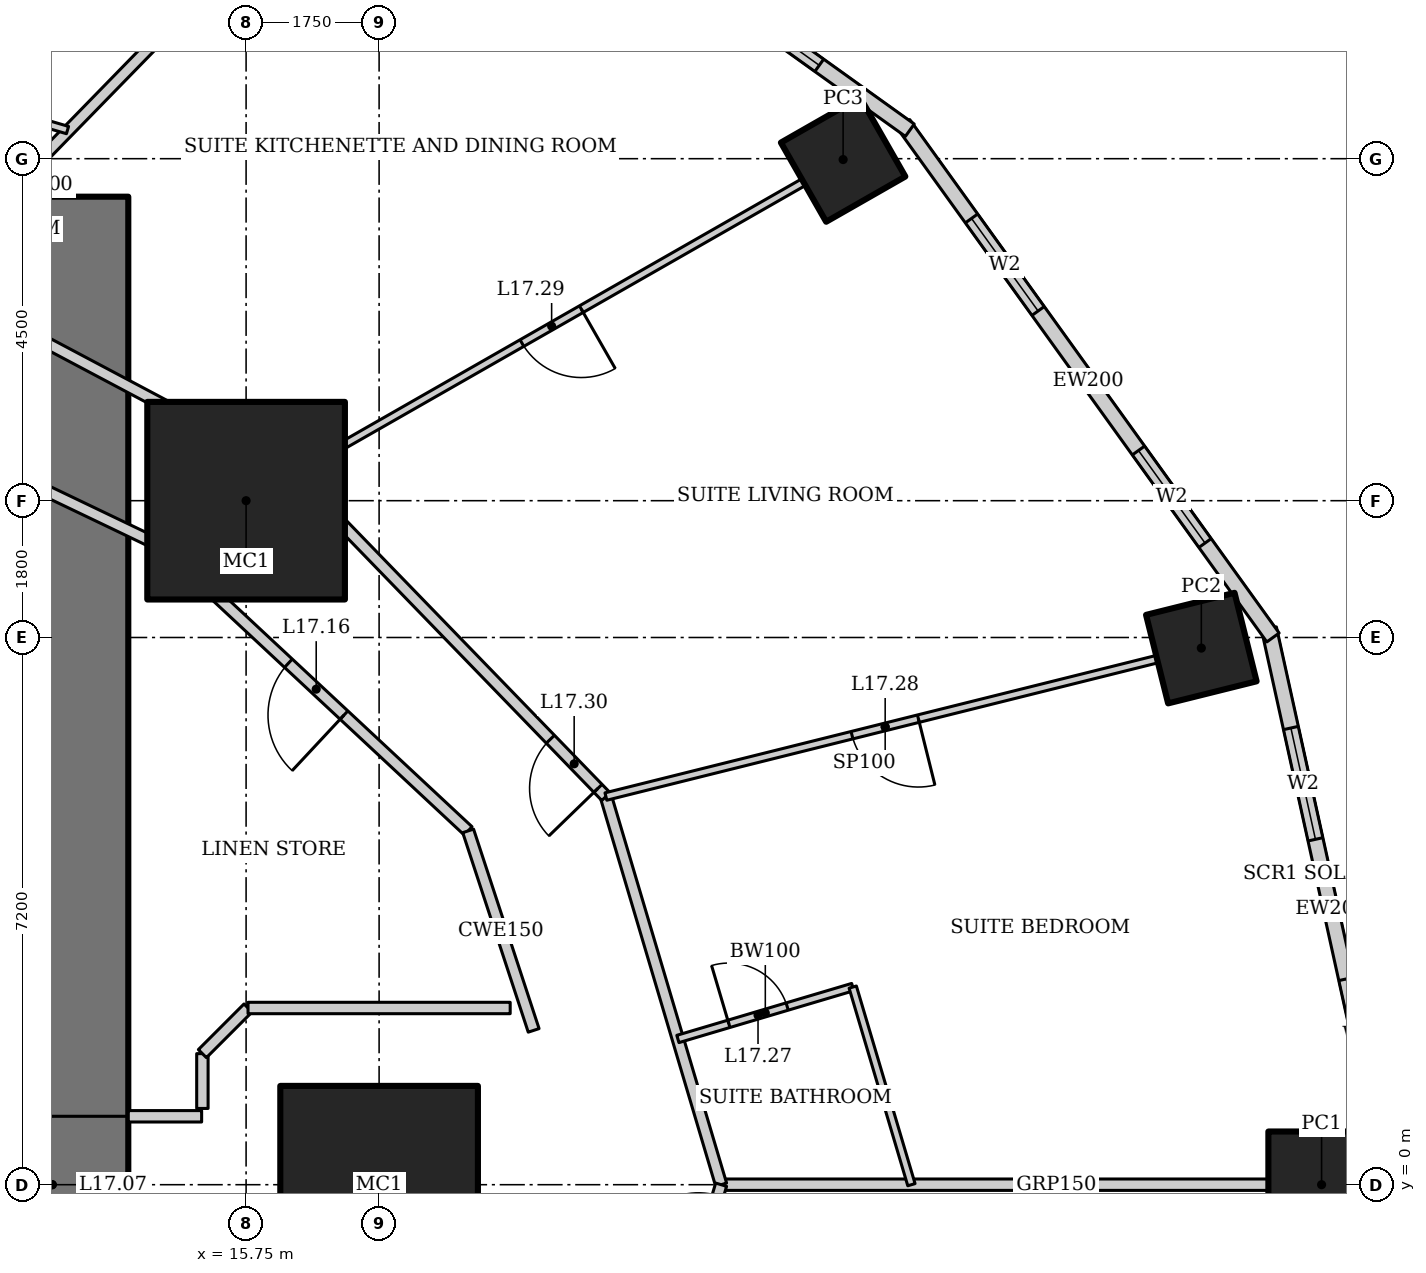
"""IFC4 building model, lengths in metres.
Left out: names, types, materials, properties, quantities, classifications, styles, units other than length and angle.
Written with IfcOpenShell. Run it as: python <this file> out.ifc"""

import sys

from ifc_helpers import new_model, si_unit, direction, frame, frame_2d, origin, origin_2d, place, context, subcontext, project, spatial, rectangle, hollow_rectangle, extrude, element, fill, save


model = new_model("IFC4")
c1 = context("Model", 3, precision=1e-05, world=origin(), true_north=direction((0.0, 1.0)))
c2 = subcontext(c1, "Body", "Model", "MODEL_VIEW")
j1 = project(units=[si_unit("LENGTHUNIT", "METRE"), si_unit("PLANEANGLEUNIT", "RADIAN")], contexts=[c1])
p1 = place(None, origin())
s1 = spatial("IfcSite", under=j1, at=p1, CompositionType="ELEMENT")
p2 = place(p1, origin())
s2 = spatial("IfcBuilding", under=s1, at=p2, CompositionType="ELEMENT")
p3 = place(p2, frame((0.0, 0.0, 76.6)))
s3 = spatial("IfcBuildingStorey", under=s2, at=p3, CompositionType="ELEMENT", Elevation=76.6)
for number, where, z_axis, x_axis in (
    (1, (17.5, 0.0, 0.0), (0.0, 0.0, 1.0), (1.0, 0.0, 0.0)),
    (2, (15.75, 9.0, 0.0), (0.0, 0.0, 1.0), (1.0, 0.0, 0.0)),
):
    element("IfcColumn", number, at=place(p3, frame(where, z_axis=z_axis, x_axis=x_axis)), inside=s3, PredefinedType="COLUMN", context=c2, shape_type="SweptSolid", body=[
        extrude(hollow_rectangle(XDim=2.6, YDim=2.6, WallThickness=0.13, at=origin_2d()), origin(), (0.0, 0.0, 1.0), 3.6),
    ])
p4 = place(p3, frame((29.9, 0.0, 0.0), z_axis=(0.0, 0.0, 1.0), x_axis=(1.0, 0.0, 0.0)))
e3 = element("IfcColumn", 3, at=p4, inside=s3, PredefinedType="COLUMN", context=c2, shape_type="SweptSolid", body=[
    extrude(hollow_rectangle(XDim=1.4, YDim=1.4, WallThickness=0.1, at=origin_2d()), origin(), (0.0, 0.0, 1.0), 3.6),
])
p5 = place(p3, frame((28.318, 7.06, 0.0), z_axis=(0.0, 0.0, 1.0), x_axis=(0.970295726276, 0.2419218956, 0.0)))
e4 = element("IfcColumn", 4, at=p5, inside=s3, PredefinedType="COLUMN", context=c2, shape_type="SweptSolid", body=[
    extrude(hollow_rectangle(XDim=1.2, YDim=1.2, WallThickness=0.1, at=origin_2d()), origin(), (0.0, 0.0, 1.0), 3.6),
])
p6 = place(p3, frame((23.605, 13.489, 0.0), z_axis=(0.0, 0.0, 1.0), x_axis=(0.86824298017, 0.496139221777, 0.0)))
e5 = element("IfcColumn", 5, at=p6, inside=s3, PredefinedType="COLUMN", context=c2, shape_type="SweptSolid", body=[
    extrude(hollow_rectangle(XDim=1.2, YDim=1.2, WallThickness=0.12, at=origin_2d()), origin(), (0.0, 0.0, 1.0), 3.6),
])
p7 = place(p3, frame((13.2, -13.0, 0.0), z_axis=(0.0, 0.0, 1.0), x_axis=(0.0, 1.0, 0.0)))
e6 = element("IfcWall", 6, at=p7, inside=s3, PredefinedType="SHEAR", context=c2, shape_type="SweptSolid", body=[
    extrude(rectangle(XDim=26.0, YDim=2.0, at=frame_2d((13.0, 0.0))), origin(), (0.0, 0.0, 1.0), 3.6),
])
p8 = place(p7, frame((12.1, 0.0, 0.0)))
e7 = element("IfcOpeningElement", 7, at=p8, cuts=e6, PredefinedType="OPENING", context=c2, shape_type="SweptSolid", body=[
    extrude(rectangle(XDim=1.8, YDim=2.1, at=frame_2d((0.9, 1.05))), frame((0.0, 1.01, 0.0), z_axis=(0.0, -1.0, 0.0), x_axis=(1.0, 0.0, 0.0)), (0.0, 0.0, 1.0), 2.02),
])
p9 = place(p3, frame((30.835, -0.067, 0.0), z_axis=(0.0, 0.0, 1.0), x_axis=(-0.215238065514, 0.976561608478, 0.0)))
e8 = element("IfcWall", 8, at=p9, inside=s3, PredefinedType="SOLIDWALL", context=c2, shape_type="SweptSolid", body=[
    extrude(rectangle(XDim=7.562, YDim=0.2, at=frame_2d((3.781, 0.0))), origin(), (0.0, 0.0, 1.0), 3.45),
])
p10 = place(p9, frame((1.341, 0.0, 0.5)))
e9 = element("IfcOpeningElement", 9, at=p10, cuts=e8, PredefinedType="OPENING", context=c2, shape_type="SweptSolid", body=[
    extrude(rectangle(XDim=1.5, YDim=2.2, at=frame_2d((0.75, 1.1))), frame((0.0, 0.11, 0.0), z_axis=(0.0, -1.0, 0.0), x_axis=(1.0, 0.0, 0.0)), (0.0, 0.0, 1.0), 0.22),
])
p11 = place(p9, frame((4.722, 0.0, 0.5)))
e10 = element("IfcOpeningElement", 10, at=p11, cuts=e8, PredefinedType="OPENING", context=c2, shape_type="SweptSolid", body=[
    extrude(rectangle(XDim=1.5, YDim=2.2, at=frame_2d((0.75, 1.1))), frame((0.0, 0.11, 0.0), z_axis=(0.0, -1.0, 0.0), x_axis=(1.0, 0.0, 0.0)), (0.0, 0.0, 1.0), 0.22),
])
p12 = place(p3, frame((29.26, 7.2, 0.0), z_axis=(0.0, 0.0, 1.0), x_axis=(-0.583937613703, 0.811798536155, 0.0)))
e11 = element("IfcWall", 11, at=p12, inside=s3, PredefinedType="SOLIDWALL", context=c2, shape_type="SweptSolid", body=[
    extrude(rectangle(XDim=8.323, YDim=0.2, at=frame_2d((4.162, 0.0))), origin(), (0.0, 0.0, 1.0), 3.45),
])
p13 = place(p12, frame((1.531, 0.0, 0.5)))
e12 = element("IfcOpeningElement", 12, at=p13, cuts=e11, PredefinedType="OPENING", context=c2, shape_type="SweptSolid", body=[
    extrude(rectangle(XDim=1.5, YDim=2.2, at=frame_2d((0.75, 1.1))), frame((0.0, 0.11, 0.0), z_axis=(0.0, -1.0, 0.0), x_axis=(1.0, 0.0, 0.0)), (0.0, 0.0, 1.0), 0.22),
])
p14 = place(p12, frame((5.292, 0.0, 0.5)))
e13 = element("IfcOpeningElement", 13, at=p14, cuts=e11, PredefinedType="OPENING", context=c2, shape_type="SweptSolid", body=[
    extrude(rectangle(XDim=1.5, YDim=2.2, at=frame_2d((0.75, 1.1))), frame((0.0, 0.11, 0.0), z_axis=(0.0, -1.0, 0.0), x_axis=(1.0, 0.0, 0.0)), (0.0, 0.0, 1.0), 0.22),
])
p15 = place(p3, frame((24.482, 13.875, 0.0), z_axis=(0.0, 0.0, 1.0), x_axis=(-0.812791321576, 0.582554948112, 0.0)))
e14 = element("IfcWall", 14, at=p15, inside=s3, PredefinedType="SOLIDWALL", context=c2, shape_type="SweptSolid", body=[
    extrude(rectangle(XDim=8.063, YDim=0.2, at=frame_2d((4.032, 0.0))), origin(), (0.0, 0.0, 1.0), 3.45),
])
p16 = place(p15, frame((1.466, 0.0, 0.5)))
e15 = element("IfcOpeningElement", 15, at=p16, cuts=e14, PredefinedType="OPENING", context=c2, shape_type="SweptSolid", body=[
    extrude(rectangle(XDim=1.5, YDim=2.2, at=frame_2d((0.75, 1.1))), frame((0.0, 0.11, 0.0), z_axis=(0.0, -1.0, 0.0), x_axis=(1.0, 0.0, 0.0)), (0.0, 0.0, 1.0), 0.22),
])
p17 = place(p15, frame((5.097, 0.0, 0.5)))
e16 = element("IfcOpeningElement", 16, at=p17, cuts=e14, PredefinedType="OPENING", context=c2, shape_type="SweptSolid", body=[
    extrude(rectangle(XDim=1.5, YDim=2.2, at=frame_2d((0.75, 1.1))), frame((0.0, 0.11, 0.0), z_axis=(0.0, -1.0, 0.0), x_axis=(1.0, 0.0, 0.0)), (0.0, 0.0, 1.0), 0.22),
])
p18 = place(p3, frame((29.208, -7.318, 0.0), z_axis=(0.0, 0.0, 1.0), x_axis=(0.215238065514, 0.976561608478, 0.0)))
e17 = element("IfcWall", 17, at=p18, inside=s3, PredefinedType="SOLIDWALL", context=c2, shape_type="SweptSolid", body=[
    extrude(rectangle(XDim=7.562, YDim=0.2, at=frame_2d((3.781, 0.0))), origin(), (0.0, 0.0, 1.0), 3.45),
])
p19 = place(p18, frame((1.341, 0.0, 0.5)))
e18 = element("IfcOpeningElement", 18, at=p19, cuts=e17, PredefinedType="OPENING", context=c2, shape_type="SweptSolid", body=[
    extrude(rectangle(XDim=1.5, YDim=2.2, at=frame_2d((0.75, 1.1))), frame((0.0, 0.11, 0.0), z_axis=(0.0, -1.0, 0.0), x_axis=(1.0, 0.0, 0.0)), (0.0, 0.0, 1.0), 0.22),
])
p20 = place(p18, frame((4.722, 0.0, 0.5)))
e19 = element("IfcOpeningElement", 19, at=p20, cuts=e17, PredefinedType="OPENING", context=c2, shape_type="SweptSolid", body=[
    extrude(rectangle(XDim=1.5, YDim=2.2, at=frame_2d((0.75, 1.1))), frame((0.0, 0.11, 0.0), z_axis=(0.0, -1.0, 0.0), x_axis=(1.0, 0.0, 0.0)), (0.0, 0.0, 1.0), 0.22),
])
p21 = place(p3, frame((30.821, 0.0, 0.0), z_axis=(0.0, 0.0, 1.0), x_axis=(-1.0, 0.0, 0.0)))
e20 = element("IfcWall", 20, at=p21, inside=s3, PredefinedType="PARTITIONING", context=c2, shape_type="SweptSolid", body=[
    extrude(rectangle(XDim=8.821, YDim=0.15, at=frame_2d((4.41, 0.0))), origin(), (0.0, 0.0, 1.0), 2.528),
])
p22 = place(p3, frame((17.97, 18.542, 0.0), z_axis=(0.0, 0.0, 1.0), x_axis=(-0.698279935955, -0.715824790743, 0.0)))
e21 = element("IfcWall", 21, at=p22, inside=s3, PredefinedType="PARTITIONING", context=c2, shape_type="SweptSolid", body=[
    extrude(rectangle(XDim=9.24, YDim=0.15, at=frame_2d((4.62, 0.0))), origin(), (0.0, 0.0, 1.0), 2.528),
])
p23 = place(p3, frame((22.0, 0.0, 0.0), z_axis=(0.0, 0.0, 1.0), x_axis=(-0.284584469409, 0.95865096869, 0.0)))
e22 = element("IfcWall", 22, at=p23, inside=s3, PredefinedType="PARTITIONING", context=c2, shape_type="SweptSolid", body=[
    extrude(rectangle(XDim=5.327, YDim=0.15, at=frame_2d((2.664, 0.0))), origin(), (0.0, 0.0, 1.0), 3.45),
])
p24 = place(p3, frame((20.484, 5.107, 0.0), z_axis=(0.0, 0.0, 1.0), x_axis=(-0.695871090686, 0.71816671125, 0.0)))
e23 = element("IfcWall", 23, at=p24, inside=s3, PredefinedType="PARTITIONING", context=c2, shape_type="SweptSolid", body=[
    extrude(rectangle(XDim=5.913, YDim=0.15, at=frame_2d((2.957, 0.0))), origin(), (0.0, 0.0, 1.0), 3.45),
])
p25 = place(p24, frame((0.15, 0.0, 0.0)))
e24 = element("IfcOpeningElement", 24, at=p25, cuts=e23, PredefinedType="OPENING", context=c2, shape_type="SweptSolid", body=[
    extrude(rectangle(XDim=0.9, YDim=2.1, at=frame_2d((0.45, 1.05))), frame((0.0, 0.085, 0.0), z_axis=(0.0, -1.0, 0.0), x_axis=(1.0, 0.0, 0.0)), (0.0, 0.0, 1.0), 0.17),
])
p26 = place(p3, frame((16.369, 9.354, 0.0), z_axis=(0.0, 0.0, 1.0), x_axis=(-0.883334368785, 0.468743419071, 0.0)))
e25 = element("IfcWall", 25, at=p26, inside=s3, PredefinedType="PARTITIONING", context=c2, shape_type="SweptSolid", body=[
    extrude(rectangle(XDim=5.491, YDim=0.15, at=frame_2d((2.746, 0.0))), origin(), (0.0, 0.0, 1.0), 3.45),
])
p27 = place(p3, frame((20.484, -5.107, 0.0), z_axis=(0.0, 0.0, 1.0), x_axis=(0.284584469409, 0.95865096869, 0.0)))
e26 = element("IfcWall", 26, at=p27, inside=s3, PredefinedType="PARTITIONING", context=c2, shape_type="SweptSolid", body=[
    extrude(rectangle(XDim=5.327, YDim=0.15, at=frame_2d((2.664, 0.0))), origin(), (0.0, 0.0, 1.0), 3.45),
])
p28 = place(p27, frame((4.278, 0.0, 0.0)))
e27 = element("IfcOpeningElement", 27, at=p28, cuts=e26, PredefinedType="OPENING", context=c2, shape_type="SweptSolid", body=[
    extrude(rectangle(XDim=0.9, YDim=2.1, at=frame_2d((0.45, 1.05))), frame((0.0, 0.085, 0.0), z_axis=(0.0, -1.0, 0.0), x_axis=(1.0, 0.0, 0.0)), (0.0, 0.0, 1.0), 0.17),
])
p29 = place(p3, frame((18.672, 4.655, 0.0), z_axis=(0.0, 0.0, 1.0), x_axis=(-0.731260145007, 0.682098673452, 0.0)))
e28 = element("IfcWall", 28, at=p29, inside=s3, PredefinedType="PARTITIONING", context=c2, shape_type="SweptSolid", body=[
    extrude(rectangle(XDim=5.468, YDim=0.15, at=frame_2d((2.734, 0.0))), origin(), (0.0, 0.0, 1.0), 3.45),
])
p30 = place(p29, frame((2.234, 0.0, 0.0)))
e29 = element("IfcOpeningElement", 29, at=p30, cuts=e28, PredefinedType="OPENING", context=c2, shape_type="SweptSolid", body=[
    extrude(rectangle(XDim=1.0, YDim=2.1, at=frame_2d((0.5, 1.05))), frame((0.0, 0.085, 0.0), z_axis=(0.0, -1.0, 0.0), x_axis=(1.0, 0.0, 0.0)), (0.0, 0.0, 1.0), 0.17),
])
p31 = place(p3, frame((14.673, 8.385, 0.0), z_axis=(0.0, 0.0, 1.0), x_axis=(-0.901869692799, 0.43200816799, 0.0)))
e30 = element("IfcWall", 30, at=p31, inside=s3, PredefinedType="PARTITIONING", context=c2, shape_type="SweptSolid", body=[
    extrude(rectangle(XDim=4.986, YDim=0.15, at=frame_2d((2.493, 0.0))), origin(), (0.0, 0.0, 1.0), 3.45),
])
p32 = place(p3, frame((21.431, 1.917, 0.0), z_axis=(0.0, 0.0, 1.0), x_axis=(0.958639927723, 0.284621659356, 0.0)))
e31 = element("IfcWall", 31, at=p32, inside=s3, PredefinedType="PARTITIONING", context=c2, shape_type="SweptSolid", body=[
    extrude(rectangle(XDim=2.4, YDim=0.1, at=frame_2d((1.2, 0.0))), origin(), (0.0, 0.0, 1.0), 3.45),
])
p33 = place(p32, frame((0.7, 0.0, 0.0)))
e32 = element("IfcOpeningElement", 32, at=p33, cuts=e31, PredefinedType="OPENING", context=c2, shape_type="SweptSolid", body=[
    extrude(rectangle(XDim=0.8, YDim=2.1, at=frame_2d((0.4, 1.05))), frame((0.0, 0.06, 0.0), z_axis=(0.0, -1.0, 0.0), x_axis=(1.0, 0.0, 0.0)), (0.0, 0.0, 1.0), 0.12),
])
p34 = place(p3, frame((23.732, 2.6, 0.0), z_axis=(0.0, 0.0, 1.0), x_axis=(0.284514277473, -0.958671803025, 0.0)))
e33 = element("IfcWall", 33, at=p34, inside=s3, PredefinedType="PARTITIONING", context=c2, shape_type="SweptSolid", body=[
    extrude(rectangle(XDim=2.712, YDim=0.1, at=frame_2d((1.356, 0.0))), origin(), (0.0, 0.0, 1.0), 3.45),
])
p35 = place(p3, frame((27.833, 6.939, 0.0), z_axis=(0.0, 0.0, 1.0), x_axis=(-0.970295894358, -0.24192122146, 0.0)))
e34 = element("IfcWall", 34, at=p35, inside=s3, PredefinedType="PARTITIONING", context=c2, shape_type="SweptSolid", body=[
    extrude(rectangle(XDim=7.574, YDim=0.1, at=frame_2d((3.787, 0.0))), origin(), (0.0, 0.0, 1.0), 2.332),
])
p36 = place(p35, frame((3.337, 0.0, 0.0)))
e35 = element("IfcOpeningElement", 35, at=p36, cuts=e34, PredefinedType="OPENING", context=c2, shape_type="SweptSolid", body=[
    extrude(rectangle(XDim=0.9, YDim=2.1, at=frame_2d((0.45, 1.05))), frame((0.0, 0.06, 0.0), z_axis=(0.0, -1.0, 0.0), x_axis=(1.0, 0.0, 0.0)), (0.0, 0.0, 1.0), 0.12),
])
p37 = place(p3, frame((23.171, 13.24, 0.0), z_axis=(0.0, 0.0, 1.0), x_axis=(-0.868243142124, -0.496138938357, 0.0)))
e36 = element("IfcWall", 36, at=p37, inside=s3, PredefinedType="PARTITIONING", context=c2, shape_type="SweptSolid", body=[
    extrude(rectangle(XDim=7.834, YDim=0.1, at=frame_2d((3.917, 0.0))), origin(), (0.0, 0.0, 1.0), 2.693),
])
p38 = place(p37, frame((3.467, 0.0, 0.0)))
e37 = element("IfcOpeningElement", 37, at=p38, cuts=e36, PredefinedType="OPENING", context=c2, shape_type="SweptSolid", body=[
    extrude(rectangle(XDim=0.9, YDim=2.1, at=frame_2d((0.45, 1.05))), frame((0.0, 0.06, 0.0), z_axis=(0.0, -1.0, 0.0), x_axis=(1.0, 0.0, 0.0)), (0.0, 0.0, 1.0), 0.12),
])
p39 = place(p3, frame((10.276, 14.794, 0.0), z_axis=(0.0, 0.0, 1.0), x_axis=(0.959495516486, -0.281723896473, 0.0)))
e38 = element("IfcWall", 38, at=p39, inside=s3, PredefinedType="PARTITIONING", context=c2, shape_type="SweptSolid", body=[
    extrude(rectangle(XDim=3.257, YDim=0.1, at=frame_2d((1.628, 0.0))), origin(), (0.0, 0.0, 1.0), 3.45),
])
p40 = place(p3, frame((13.2, 13.0, 0.0), z_axis=(0.0, 0.0, 1.0), x_axis=(-0.715906247499, 0.698196422786, 0.0)))
e39 = element("IfcWall", 39, at=p40, inside=s3, PredefinedType="PARTITIONING", context=c2, shape_type="SweptSolid", body=[
    extrude(rectangle(XDim=0.455, YDim=0.1, at=frame_2d((0.228, 0.0))), origin(), (0.0, 0.0, 1.0), 3.45),
])
p41 = place(p3, frame((19.533, 2.03, 0.0), z_axis=(0.0, 0.0, 1.0), x_axis=(-0.311929965981, 0.950105097515, 0.0)))
e40 = element("IfcWall", 40, at=p41, inside=s3, PredefinedType="PARTITIONING", context=c2, shape_type="SweptSolid", body=[
    extrude(rectangle(XDim=2.763, YDim=0.15, at=frame_2d((1.381, 0.0))), origin(), (0.0, 0.0, 1.0), 3.45),
])
p42 = place(p3, frame((14.2, 0.9, 0.0), z_axis=(0.0, 0.0, 1.0), x_axis=(1.0, 0.0, 0.0)))
e41 = element("IfcWall", 41, at=p42, inside=s3, PredefinedType="PARTITIONING", context=c2, shape_type="SweptSolid", body=[
    extrude(rectangle(XDim=0.965, YDim=0.15, at=frame_2d((0.482, 0.0))), origin(), (0.0, 0.0, 1.0), 3.45),
])
p43 = place(p3, frame((15.175, 1.003, 0.0), z_axis=(0.0, 0.0, 1.0), x_axis=(0.0, 1.0, 0.0)))
e42 = element("IfcWall", 42, at=p43, inside=s3, PredefinedType="PARTITIONING", context=c2, shape_type="SweptSolid", body=[
    extrude(rectangle(XDim=0.721, YDim=0.15, at=frame_2d((0.361, 0.0))), origin(), (0.0, 0.0, 1.0), 3.45),
])
p44 = place(p3, frame((15.175, 1.725, 0.0), z_axis=(0.0, 0.0, 1.0), x_axis=(0.707106781187, 0.707106781187, 0.0)))
e43 = element("IfcWall", 43, at=p44, inside=s3, PredefinedType="PARTITIONING", context=c2, shape_type="SweptSolid", body=[
    extrude(rectangle(XDim=0.849, YDim=0.15, at=frame_2d((0.425, 0.0))), origin(), (0.0, 0.0, 1.0), 3.45),
])
p45 = place(p3, frame((15.775, 2.325, 0.0), z_axis=(0.0, 0.0, 1.0), x_axis=(1.0, 0.0, 0.0)))
e44 = element("IfcWall", 44, at=p45, inside=s3, PredefinedType="PARTITIONING", context=c2, shape_type="SweptSolid", body=[
    extrude(rectangle(XDim=3.449, YDim=0.15, at=frame_2d((1.725, 0.0))), origin(), (0.0, 0.0, 1.0), 3.45),
])
p46 = place(p10, origin())
e45 = element("IfcWindow", 45, at=p46, inside=s3, PartitioningType="SINGLE_PANEL", PredefinedType="WINDOW", context=c2, shape_type="SweptSolid", body=[
    extrude(rectangle(XDim=1.5, YDim=2.2, at=frame_2d((0.75, 1.1))), frame((0.0, 0.03, 0.0), z_axis=(0.0, -1.0, 0.0), x_axis=(1.0, 0.0, 0.0)), (0.0, 0.0, 1.0), 0.06),
])
fill(e9, e45)
p47 = place(p11, origin())
e46 = element("IfcWindow", 46, at=p47, inside=s3, PartitioningType="SINGLE_PANEL", PredefinedType="WINDOW", context=c2, shape_type="SweptSolid", body=[
    extrude(rectangle(XDim=1.5, YDim=2.2, at=frame_2d((0.75, 1.1))), frame((0.0, 0.03, 0.0), z_axis=(0.0, -1.0, 0.0), x_axis=(1.0, 0.0, 0.0)), (0.0, 0.0, 1.0), 0.06),
])
fill(e10, e46)
p48 = place(p13, origin())
e47 = element("IfcWindow", 47, at=p48, inside=s3, PartitioningType="SINGLE_PANEL", PredefinedType="WINDOW", context=c2, shape_type="SweptSolid", body=[
    extrude(rectangle(XDim=1.5, YDim=2.2, at=frame_2d((0.75, 1.1))), frame((0.0, 0.03, 0.0), z_axis=(0.0, -1.0, 0.0), x_axis=(1.0, 0.0, 0.0)), (0.0, 0.0, 1.0), 0.06),
])
fill(e12, e47)
p49 = place(p14, origin())
e48 = element("IfcWindow", 48, at=p49, inside=s3, PartitioningType="SINGLE_PANEL", PredefinedType="WINDOW", context=c2, shape_type="SweptSolid", body=[
    extrude(rectangle(XDim=1.5, YDim=2.2, at=frame_2d((0.75, 1.1))), frame((0.0, 0.03, 0.0), z_axis=(0.0, -1.0, 0.0), x_axis=(1.0, 0.0, 0.0)), (0.0, 0.0, 1.0), 0.06),
])
fill(e13, e48)
p50 = place(p16, origin())
e49 = element("IfcWindow", 49, at=p50, inside=s3, PartitioningType="SINGLE_PANEL", PredefinedType="WINDOW", context=c2, shape_type="SweptSolid", body=[
    extrude(rectangle(XDim=1.5, YDim=2.2, at=frame_2d((0.75, 1.1))), frame((0.0, 0.03, 0.0), z_axis=(0.0, -1.0, 0.0), x_axis=(1.0, 0.0, 0.0)), (0.0, 0.0, 1.0), 0.06),
])
fill(e15, e49)
p51 = place(p8, origin())
e50 = element("IfcDoor", 50, at=p51, inside=s3, OperationType="DOUBLE_DOOR_DOUBLE_SWING", PredefinedType="DOOR", context=c2, shape_type="SweptSolid", body=[
    extrude(rectangle(XDim=1.8, YDim=2.1, at=frame_2d((0.9, 1.05))), frame((0.0, 0.025, 0.0), z_axis=(0.0, -1.0, 0.0), x_axis=(1.0, 0.0, 0.0)), (0.0, 0.0, 1.0), 0.05),
])
fill(e7, e50)
p52 = place(p30, origin())
e51 = element("IfcDoor", 51, at=p52, inside=s3, OperationType="SINGLE_SWING_LEFT", PredefinedType="DOOR", context=c2, shape_type="SweptSolid", body=[
    extrude(rectangle(XDim=1.0, YDim=2.1, at=frame_2d((0.5, 1.05))), frame((0.0, 0.025, 0.0), z_axis=(0.0, -1.0, 0.0), x_axis=(1.0, 0.0, 0.0)), (0.0, 0.0, 1.0), 0.05),
])
fill(e29, e51)
p53 = place(p33, origin())
e52 = element("IfcDoor", 52, at=p53, inside=s3, OperationType="SINGLE_SWING_LEFT", PredefinedType="DOOR", context=c2, shape_type="SweptSolid", body=[
    extrude(rectangle(XDim=0.8, YDim=2.1, at=frame_2d((0.4, 1.05))), frame((0.0, 0.025, 0.0), z_axis=(0.0, -1.0, 0.0), x_axis=(1.0, 0.0, 0.0)), (0.0, 0.0, 1.0), 0.05),
])
fill(e32, e52)
p54 = place(p36, origin())
e53 = element("IfcDoor", 53, at=p54, inside=s3, OperationType="SINGLE_SWING_LEFT", PredefinedType="DOOR", context=c2, shape_type="SweptSolid", body=[
    extrude(rectangle(XDim=0.9, YDim=2.1, at=frame_2d((0.45, 1.05))), frame((0.0, 0.025, 0.0), z_axis=(0.0, -1.0, 0.0), x_axis=(1.0, 0.0, 0.0)), (0.0, 0.0, 1.0), 0.05),
])
fill(e35, e53)
p55 = place(p38, origin())
e54 = element("IfcDoor", 54, at=p55, inside=s3, OperationType="SINGLE_SWING_LEFT", PredefinedType="DOOR", context=c2, shape_type="SweptSolid", body=[
    extrude(rectangle(XDim=0.9, YDim=2.1, at=frame_2d((0.45, 1.05))), frame((0.0, 0.025, 0.0), z_axis=(0.0, -1.0, 0.0), x_axis=(1.0, 0.0, 0.0)), (0.0, 0.0, 1.0), 0.05),
])
fill(e37, e54)
p56 = place(p25, origin())
e55 = element("IfcDoor", 55, at=p56, inside=s3, OperationType="SINGLE_SWING_LEFT", PredefinedType="DOOR", context=c2, shape_type="SweptSolid", body=[
    extrude(rectangle(XDim=0.9, YDim=2.1, at=frame_2d((0.45, 1.05))), frame((0.0, 0.025, 0.0), z_axis=(0.0, -1.0, 0.0), x_axis=(1.0, 0.0, 0.0)), (0.0, 0.0, 1.0), 0.05),
])
fill(e24, e55)
save(model, sys.argv[1])
